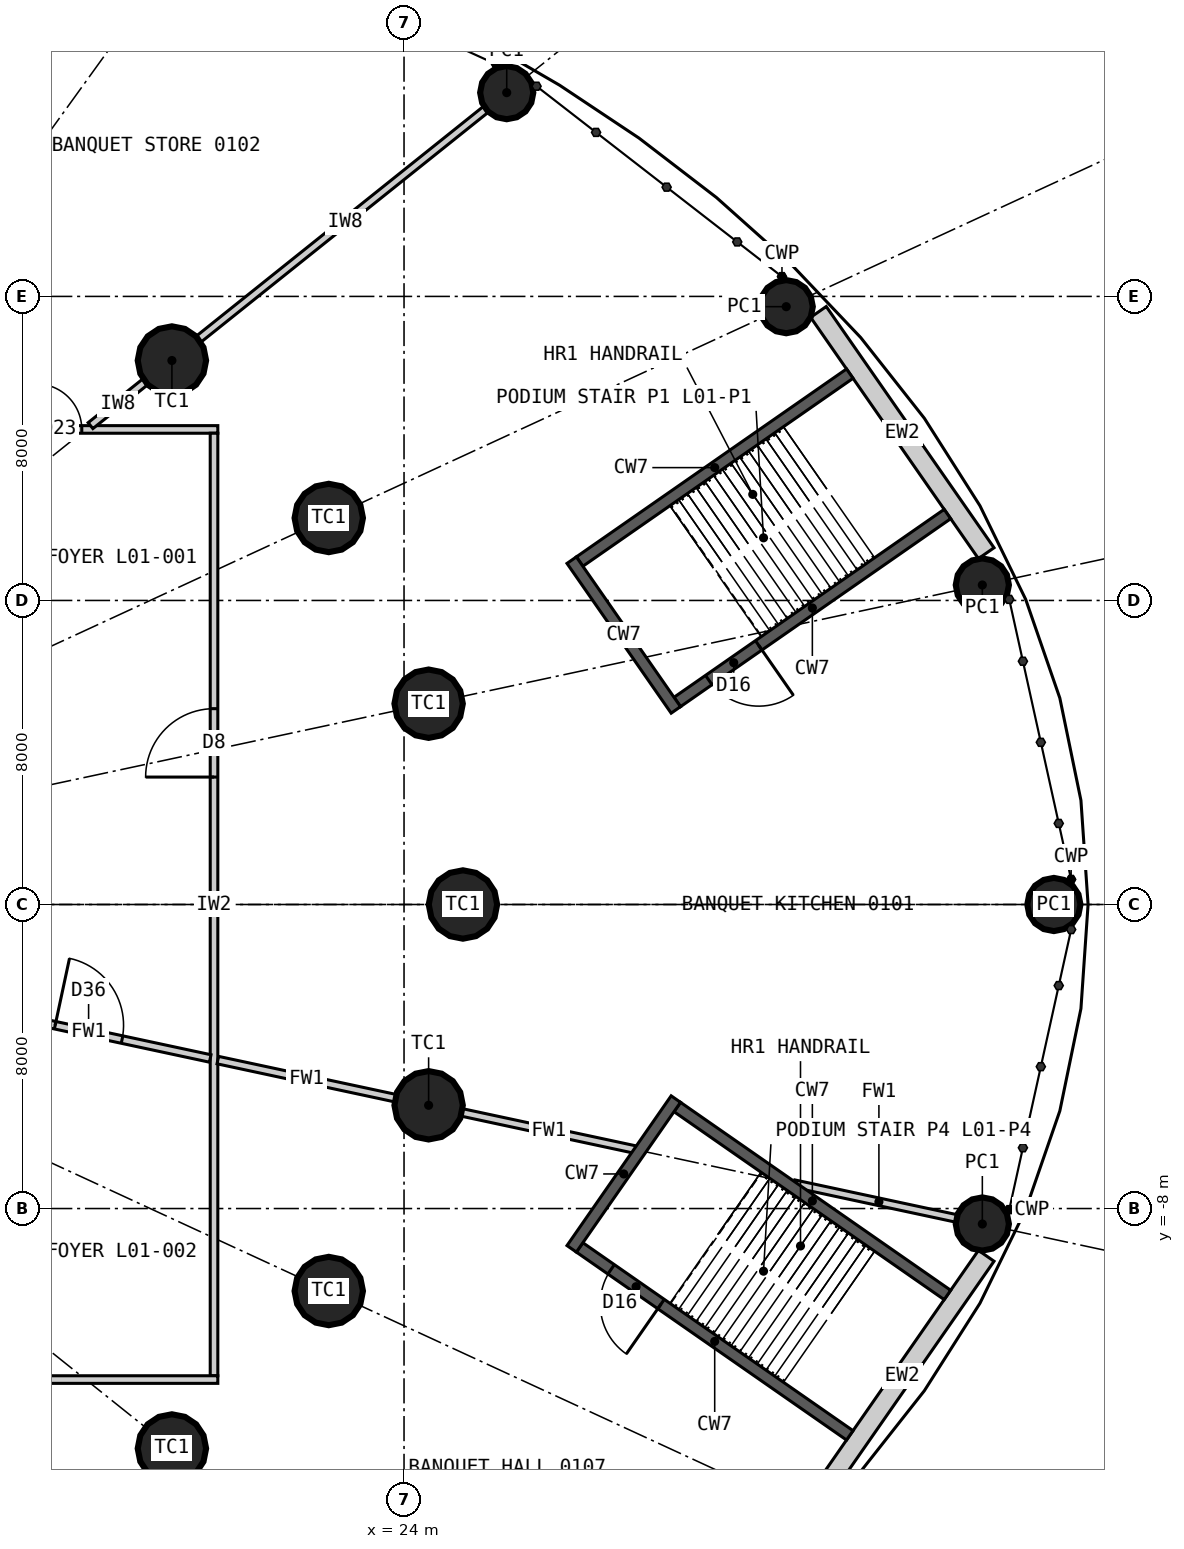
"""IFC4 building model, lengths in metres.
Left out: names, types, materials, properties, quantities, classifications, styles, units other than length and angle.
Written with IfcOpenShell. Run it as: python <this file> out.ifc"""

import sys

from ifc_helpers import new_model, si_unit, direction, frame, frame_2d, origin, origin_2d, place, context, subcontext, project, spatial, rectangle, circle, extrude, element, fill, save


model = new_model("IFC4")
c1 = context("Model", 3, precision=1e-05, world=origin(), true_north=direction((0.0, 1.0)))
c2 = subcontext(c1, "Body", "Model", "MODEL_VIEW")
j1 = project(units=[si_unit("LENGTHUNIT", "METRE"), si_unit("PLANEANGLEUNIT", "RADIAN")], contexts=[c1])
p1 = place(None, origin())
s1 = spatial("IfcSite", under=j1, at=p1, CompositionType="ELEMENT")
p2 = place(p1, origin())
s2 = spatial("IfcBuilding", under=s1, at=p2, CompositionType="ELEMENT")
p3 = place(p2, frame((0.0, 0.0, 7.2)))
s3 = spatial("IfcBuildingStorey", under=s2, at=p3, CompositionType="ELEMENT", Elevation=7.2)
for number, where, z_axis, x_axis in (
    (1, (25.55, 0.0, 0.0), (0.0, 0.0, 1.0), (1.0, 0.0, 0.0)),
    (2, (24.647, 5.283, 0.0), (0.0, 0.0, 1.0), (1.0, 0.0, 0.0)),
    (3, (22.019, 10.17, 0.0), (0.0, 0.0, 1.0), (1.0, 0.0, 0.0)),
    (4, (17.892, 14.313, 0.0), (0.0, 0.0, 1.0), (1.0, 0.0, 0.0)),
    (5, (17.892, -14.313, 0.0), (0.0, 0.0, 1.0), (1.0, 0.0, 0.0)),
    (6, (22.019, -10.17, 0.0), (0.0, 0.0, 1.0), (1.0, 0.0, 0.0)),
    (7, (24.647, -5.283, 0.0), (0.0, 0.0, 1.0), (1.0, 0.0, 0.0)),
):
    element("IfcColumn", number, at=place(p3, frame(where, z_axis=z_axis, x_axis=x_axis)), inside=s3, PredefinedType="COLUMN", context=c2, shape_type="SweptSolid", body=[
        extrude(circle(Radius=0.9, at=origin_2d()), origin(), (0.0, 0.0, 1.0), 6.6),
    ])
for number, where, z_axis, x_axis in (
    (8, (41.1, 0.0, 0.0), (0.0, 0.0, 1.0), (1.0, 0.0, 0.0)),
    (9, (39.218, 8.407, 0.0), (0.0, 0.0, 1.0), (1.0, 0.0, 0.0)),
    (10, (34.057, 15.73, 0.0), (0.0, 0.0, 1.0), (1.0, 0.0, 0.0)),
    (11, (26.702, 21.362, 0.0), (0.0, 0.0, 1.0), (1.0, 0.0, 0.0)),
    (12, (39.218, -8.407, 0.0), (0.0, 0.0, 1.0), (1.0, 0.0, 0.0)),
):
    element("IfcColumn", number, at=place(p3, frame(where, z_axis=z_axis, x_axis=x_axis)), inside=s3, PredefinedType="COLUMN", context=c2, shape_type="SweptSolid", body=[
        extrude(circle(Radius=0.7, at=origin_2d()), origin(), (0.0, 0.0, 1.0), 6.6),
    ])
for number, where, z_axis, x_axis in (
    (13, (39.32, 9.244, 0.0), (0.0, 0.0, 1.0), (-0.571, 0.821, 0.0)),
    (14, (34.905, -15.592, 0.0), (0.0, 0.0, 1.0), (0.571, 0.821, 0.0)),
):
    element("IfcWall", number, at=place(p3, frame(where, z_axis=z_axis, x_axis=x_axis)), inside=s3, PredefinedType="SOLIDWALL", context=c2, shape_type="SweptSolid", body=[
        extrude(rectangle(XDim=7.733, YDim=0.5, at=frame_2d((3.866, 0.0))), origin(), (0.0, 0.0, 1.0), 6.35),
    ])
p4 = place(p3, frame((-19.1, 12.5, 0.0), z_axis=(0.0, 0.0, 1.0), x_axis=(1.0, 0.0, 0.0)))
e15 = element("IfcWall", 15, at=p4, inside=s3, PredefinedType="PARTITIONING", context=c2, shape_type="SweptSolid", body=[
    extrude(rectangle(XDim=38.2, YDim=0.2, at=frame_2d((19.1, 0.0))), origin(), (0.0, 0.0, 1.0), 6.35),
])
p5 = place(p4, frame((27.12, 0.0, 0.0)))
e16 = element("IfcOpeningElement", 16, at=p5, cuts=e15, PredefinedType="OPENING", context=c2, shape_type="SweptSolid", body=[
    extrude(rectangle(XDim=1.2, YDim=2.2, at=frame_2d((0.6, 1.1))), frame((0.0, 0.11, 0.0), z_axis=(0.0, -1.0, 0.0), x_axis=(1.0, 0.0, 0.0)), (0.0, 0.0, 1.0), 0.22),
])
p6 = place(p4, frame((20.71, 0.0, 0.0)))
e17 = element("IfcOpeningElement", 17, at=p6, cuts=e15, PredefinedType="OPENING", context=c2, shape_type="SweptSolid", body=[
    extrude(rectangle(XDim=1.0, YDim=2.1, at=frame_2d((0.5, 1.05))), frame((0.0, 0.11, 0.0), z_axis=(0.0, -1.0, 0.0), x_axis=(1.0, 0.0, 0.0)), (0.0, 0.0, 1.0), 0.22),
])
p7 = place(p4, frame((16.49, 0.0, 0.0)))
e18 = element("IfcOpeningElement", 18, at=p7, cuts=e15, PredefinedType="OPENING", context=c2, shape_type="SweptSolid", body=[
    extrude(rectangle(XDim=1.0, YDim=2.1, at=frame_2d((0.5, 1.05))), frame((0.0, 0.11, 0.0), z_axis=(0.0, -1.0, 0.0), x_axis=(1.0, 0.0, 0.0)), (0.0, 0.0, 1.0), 0.22),
])
p8 = place(p4, frame((11.943, 0.0, 0.0)))
e19 = element("IfcOpeningElement", 19, at=p8, cuts=e15, PredefinedType="OPENING", context=c2, shape_type="SweptSolid", body=[
    extrude(rectangle(XDim=1.0, YDim=2.2, at=frame_2d((0.5, 1.1))), frame((0.0, 0.11, 0.0), z_axis=(0.0, -1.0, 0.0), x_axis=(1.0, 0.0, 0.0)), (0.0, 0.0, 1.0), 0.22),
])
p9 = place(p4, frame((33.42, 0.0, 0.0)))
e20 = element("IfcOpeningElement", 20, at=p9, cuts=e15, PredefinedType="OPENING", context=c2, shape_type="SweptSolid", body=[
    extrude(rectangle(XDim=1.2, YDim=2.2, at=frame_2d((0.6, 1.1))), frame((0.0, 0.11, 0.0), z_axis=(0.0, -1.0, 0.0), x_axis=(1.0, 0.0, 0.0)), (0.0, 0.0, 1.0), 0.22),
])
p10 = place(p3, frame((19.0, -12.4, 0.0), z_axis=(0.0, 0.0, 1.0), x_axis=(0.0, 1.0, 0.0)))
e21 = element("IfcWall", 21, at=p10, inside=s3, PredefinedType="PARTITIONING", context=c2, shape_type="SweptSolid", body=[
    extrude(rectangle(XDim=24.8, YDim=0.2, at=frame_2d((12.4, 0.0))), origin(), (0.0, 0.0, 1.0), 6.35),
])
p11 = place(p10, frame((15.753, 0.0, 0.0)))
e22 = element("IfcOpeningElement", 22, at=p11, cuts=e21, PredefinedType="OPENING", context=c2, shape_type="SweptSolid", body=[
    extrude(rectangle(XDim=1.8, YDim=2.4, at=frame_2d((0.9, 1.2))), frame((0.0, 0.11, 0.0), z_axis=(0.0, -1.0, 0.0), x_axis=(1.0, 0.0, 0.0)), (0.0, 0.0, 1.0), 0.22),
])
p12 = place(p3, frame((19.1, -12.5, 0.0), z_axis=(0.0, 0.0, 1.0), x_axis=(-1.0, 0.0, 0.0)))
e23 = element("IfcWall", 23, at=p12, inside=s3, PredefinedType="PARTITIONING", context=c2, shape_type="SweptSolid", body=[
    extrude(rectangle(XDim=38.2, YDim=0.2, at=frame_2d((19.1, 0.0))), origin(), (0.0, 0.0, 1.0), 6.35),
])
p13 = place(p12, frame((17.9, 0.0, 0.0)))
e24 = element("IfcOpeningElement", 24, at=p13, cuts=e23, PredefinedType="OPENING", context=c2, shape_type="SweptSolid", body=[
    extrude(rectangle(XDim=2.4, YDim=2.4, at=frame_2d((1.2, 1.2))), frame((0.0, 0.11, 0.0), z_axis=(0.0, -1.0, 0.0), x_axis=(1.0, 0.0, 0.0)), (0.0, 0.0, 1.0), 0.22),
])
p14 = place(p3, frame((15.75, 12.6, 0.0), z_axis=(0.0, 0.0, 1.0), x_axis=(0.780881734892, 0.6246788904, 0.0)))
e25 = element("IfcWall", 25, at=p14, inside=s3, PredefinedType="PARTITIONING", context=c2, shape_type="SweptSolid", body=[
    extrude(rectangle(XDim=1.843, YDim=0.2, at=frame_2d((0.921, 0.0))), origin(), (0.0, 0.0, 1.0), 5.5),
])
p15 = place(p3, frame((18.594, 14.875, 0.0), z_axis=(0.0, 0.0, 1.0), x_axis=(0.780868809443, 0.624695047554, 0.0)))
e26 = element("IfcWall", 26, at=p15, inside=s3, PredefinedType="PARTITIONING", context=c2, shape_type="SweptSolid", body=[
    extrude(rectangle(XDim=9.883, YDim=0.2, at=frame_2d((4.941, 0.0))), origin(), (0.0, 0.0, 1.0), 5.45),
])
p16 = place(p3, frame((19.1, -4.094, 0.0), z_axis=(0.0, 0.0, 1.0), x_axis=(0.977784445586, -0.209612924148, 0.0)))
e27 = element("IfcWall", 27, at=p16, inside=s3, PredefinedType="PARTITIONING", context=c2, shape_type="SweptSolid", body=[
    extrude(rectangle(XDim=4.773, YDim=0.2, at=frame_2d((2.386, 0.0))), origin(), (0.0, 0.0, 1.0), 5.5),
])
p17 = place(p3, frame((25.527, -5.472, 0.0), z_axis=(0.0, 0.0, 1.0), x_axis=(0.977787143577, -0.209600338396, 0.0)))
e28 = element("IfcWall", 28, at=p17, inside=s3, PredefinedType="PARTITIONING", context=c2, shape_type="SweptSolid", body=[
    extrude(rectangle(XDim=4.68, YDim=0.2, at=frame_2d((2.34, 0.0))), origin(), (0.0, 0.0, 1.0), 5.45),
])
p18 = place(p3, frame((34.263, -7.345, 0.0), z_axis=(0.0, 0.0, 1.0), x_axis=(0.977794589892, -0.209565598271, 0.0)))
e29 = element("IfcWall", 29, at=p18, inside=s3, PredefinedType="PARTITIONING", context=c2, shape_type="SweptSolid", body=[
    extrude(rectangle(XDim=4.567, YDim=0.2, at=frame_2d((2.283, 0.0))), origin(), (0.0, 0.0, 1.0), 5.45),
])
p19 = place(p3, frame((38.299, 10.274, 0.0), z_axis=(0.0, 0.0, 1.0), x_axis=(-0.820936803751, -0.571019057692, 0.0)))
e30 = element("IfcWall", 30, at=p19, inside=s3, PredefinedType="SHEAR", context=c2, shape_type="SweptSolid", body=[
    extrude(rectangle(XDim=8.66, YDim=0.3, at=frame_2d((4.33, 0.0))), origin(), (0.0, 0.0, 1.0), 6.6),
])
p20 = place(p19, frame((6.05, 0.0, 0.0)))
e31 = element("IfcOpeningElement", 31, at=p20, cuts=e30, PredefinedType="OPENING", context=c2, shape_type="SweptSolid", body=[
    extrude(rectangle(XDim=1.6, YDim=2.1, at=frame_2d((0.8, 1.05))), frame((0.0, 0.16, 0.0), z_axis=(0.0, -1.0, 0.0), x_axis=(1.0, 0.0, 0.0)), (0.0, 0.0, 1.0), 0.32),
])
p21 = place(p3, frame((35.729, 13.968, 0.0), z_axis=(0.0, 0.0, 1.0), x_axis=(-0.82092761123, -0.571032273274, 0.0)))
e32 = element("IfcWall", 32, at=p21, inside=s3, PredefinedType="SHEAR", context=c2, shape_type="SweptSolid", body=[
    extrude(rectangle(XDim=8.66, YDim=0.3, at=frame_2d((4.33, 0.0))), origin(), (0.0, 0.0, 1.0), 6.6),
])
p22 = place(p3, frame((31.153, 5.12, 0.0), z_axis=(0.0, 0.0, 1.0), x_axis=(-0.571036173178, 0.820924898467, 0.0)))
e33 = element("IfcWall", 33, at=p22, inside=s3, PredefinedType="SHEAR", context=c2, shape_type="SweptSolid", body=[
    extrude(rectangle(XDim=4.8, YDim=0.3, at=frame_2d((2.4, 0.0))), origin(), (0.0, 0.0, 1.0), 6.6),
])
p23 = place(p3, frame((35.729, -13.968, 0.0), z_axis=(0.0, 0.0, 1.0), x_axis=(-0.82092761123, 0.571032273274, 0.0)))
e34 = element("IfcWall", 34, at=p23, inside=s3, PredefinedType="SHEAR", context=c2, shape_type="SweptSolid", body=[
    extrude(rectangle(XDim=8.66, YDim=0.3, at=frame_2d((4.33, 0.0))), origin(), (0.0, 0.0, 1.0), 6.6),
])
p24 = place(p23, frame((6.05, 0.0, 0.0)))
e35 = element("IfcOpeningElement", 35, at=p24, cuts=e34, PredefinedType="OPENING", context=c2, shape_type="SweptSolid", body=[
    extrude(rectangle(XDim=1.6, YDim=2.1, at=frame_2d((0.8, 1.05))), frame((0.0, 0.16, 0.0), z_axis=(0.0, -1.0, 0.0), x_axis=(1.0, 0.0, 0.0)), (0.0, 0.0, 1.0), 0.32),
])
p25 = place(p3, frame((38.299, -10.274, 0.0), z_axis=(0.0, 0.0, 1.0), x_axis=(-0.820936803751, 0.571019057692, 0.0)))
e36 = element("IfcWall", 36, at=p25, inside=s3, PredefinedType="SHEAR", context=c2, shape_type="SweptSolid", body=[
    extrude(rectangle(XDim=8.66, YDim=0.3, at=frame_2d((4.33, 0.0))), origin(), (0.0, 0.0, 1.0), 6.6),
])
p26 = place(p3, frame((28.412, -9.06, 0.0), z_axis=(0.0, 0.0, 1.0), x_axis=(0.571036173178, 0.820924898467, 0.0)))
e37 = element("IfcWall", 37, at=p26, inside=s3, PredefinedType="SHEAR", context=c2, shape_type="SweptSolid", body=[
    extrude(rectangle(XDim=4.8, YDim=0.3, at=frame_2d((2.4, 0.0))), origin(), (0.0, 0.0, 1.0), 6.6),
])
p27 = place(p3, frame((18.9, -4.052, 0.0), z_axis=(0.0, 0.0, 1.0), x_axis=(-0.977781666858, 0.2096258857, 0.0)))
e38 = element("IfcWall", 38, at=p27, inside=s3, PredefinedType="PARTITIONING", context=c2, shape_type="SweptSolid", body=[
    extrude(rectangle(XDim=6.545, YDim=0.2, at=frame_2d((3.273, 0.0))), origin(), (0.0, 0.0, 1.0), 6.35),
])
p28 = place(p27, frame((2.373, 0.0, 0.0)))
e39 = element("IfcOpeningElement", 39, at=p28, cuts=e38, PredefinedType="OPENING", context=c2, shape_type="SweptSolid", body=[
    extrude(rectangle(XDim=1.8, YDim=2.4, at=frame_2d((0.9, 1.2))), frame((0.0, 0.11, 0.0), z_axis=(0.0, -1.0, 0.0), x_axis=(1.0, 0.0, 0.0)), (0.0, 0.0, 1.0), 0.22),
])
p29 = place(p20, origin())
e40 = element("IfcDoor", 40, at=p29, inside=s3, OperationType="SINGLE_SWING_LEFT", PredefinedType="DOOR", context=c2, shape_type="SweptSolid", body=[
    extrude(rectangle(XDim=1.6, YDim=2.1, at=frame_2d((0.8, 1.05))), frame((0.0, 0.025, 0.0), z_axis=(0.0, -1.0, 0.0), x_axis=(1.0, 0.0, 0.0)), (0.0, 0.0, 1.0), 0.05),
])
fill(e31, e40)
p30 = place(p24, origin())
e41 = element("IfcDoor", 41, at=p30, inside=s3, OperationType="SINGLE_SWING_LEFT", PredefinedType="DOOR", context=c2, shape_type="SweptSolid", body=[
    extrude(rectangle(XDim=1.6, YDim=2.1, at=frame_2d((0.8, 1.05))), frame((0.0, 0.025, 0.0), z_axis=(0.0, -1.0, 0.0), x_axis=(1.0, 0.0, 0.0)), (0.0, 0.0, 1.0), 0.05),
])
fill(e35, e41)
p31 = place(p11, origin())
e42 = element("IfcDoor", 42, at=p31, inside=s3, OperationType="DOUBLE_DOOR_DOUBLE_SWING", PredefinedType="DOOR", context=c2, shape_type="SweptSolid", body=[
    extrude(rectangle(XDim=1.8, YDim=2.4, at=frame_2d((0.9, 1.2))), frame((0.0, 0.025, 0.0), z_axis=(0.0, -1.0, 0.0), x_axis=(1.0, 0.0, 0.0)), (0.0, 0.0, 1.0), 0.05),
])
fill(e22, e42)
p32 = place(p28, origin())
e43 = element("IfcDoor", 43, at=p32, inside=s3, OperationType="DOUBLE_DOOR_DOUBLE_SWING", PredefinedType="DOOR", context=c2, shape_type="SweptSolid", body=[
    extrude(rectangle(XDim=1.8, YDim=2.4, at=frame_2d((0.9, 1.2))), frame((0.0, 0.025, 0.0), z_axis=(0.0, -1.0, 0.0), x_axis=(1.0, 0.0, 0.0)), (0.0, 0.0, 1.0), 0.05),
])
fill(e39, e43)
p33 = place(p9, origin())
e44 = element("IfcDoor", 44, at=p33, inside=s3, OperationType="SINGLE_SWING_LEFT", PredefinedType="DOOR", context=c2, shape_type="SweptSolid", body=[
    extrude(rectangle(XDim=1.2, YDim=2.2, at=frame_2d((0.6, 1.1))), frame((0.0, 0.025, 0.0), z_axis=(0.0, -1.0, 0.0), x_axis=(1.0, 0.0, 0.0)), (0.0, 0.0, 1.0), 0.05),
])
fill(e20, e44)
save(model, sys.argv[1])
